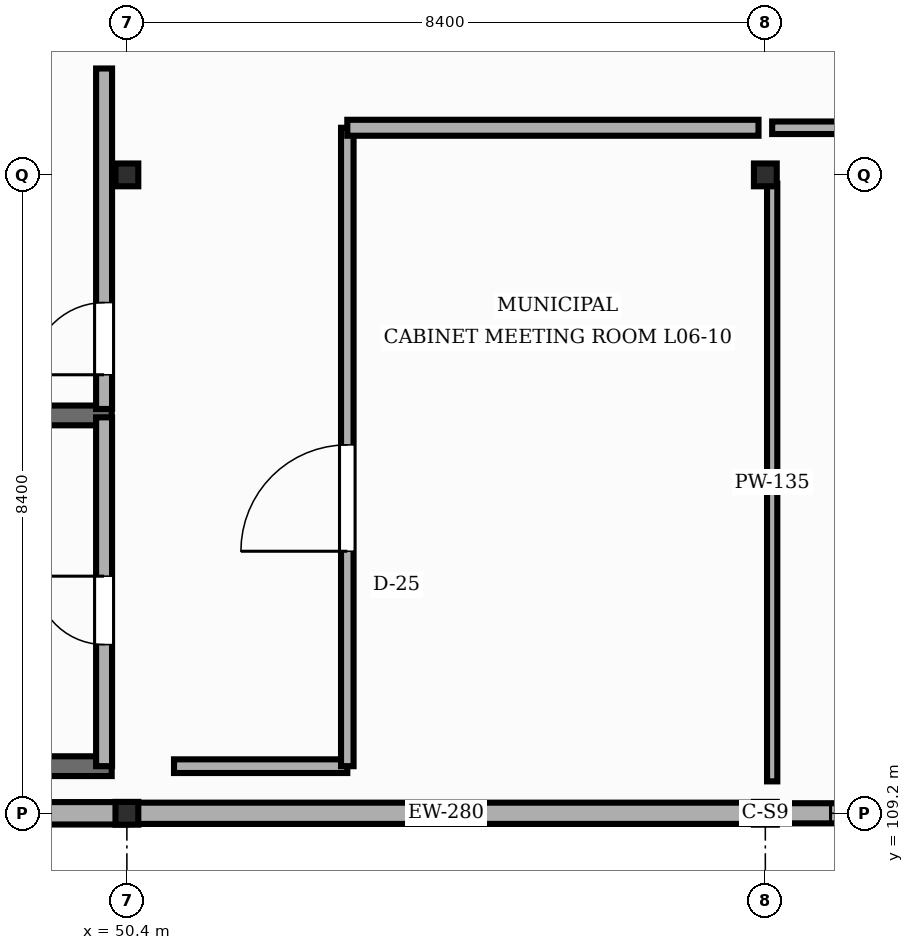
"""IFC4 building model, lengths in metres.
Left out: names, types, materials, properties, quantities, classifications, styles, units other than length and angle.
Written with IfcOpenShell. Run it as: python <this file> out.ifc"""

import sys

from ifc_helpers import new_model, si_unit, direction, frame, frame_2d, origin, origin_2d, place, context, subcontext, project, spatial, rectangle, i_section, extrude, element, fill, save


model = new_model("IFC4")
c1 = context("Model", 3, precision=1e-05, world=origin(), true_north=direction((0.0, 1.0)))
c2 = subcontext(c1, "Body", "Model", "MODEL_VIEW")
j1 = project(units=[si_unit("LENGTHUNIT", "METRE"), si_unit("PLANEANGLEUNIT", "RADIAN")], contexts=[c1])
p1 = place(None, origin())
s1 = spatial("IfcSite", under=j1, at=p1, CompositionType="ELEMENT")
p2 = place(p1, origin())
s2 = spatial("IfcBuilding", under=s1, at=p2, CompositionType="ELEMENT")
p3 = place(p2, frame((0.0, 0.0, 26.1)))
s3 = spatial("IfcBuildingStorey", under=s2, at=p3, CompositionType="ELEMENT", Elevation=26.1)
for number, where, z_axis, x_axis in (
    (1, (50.4, 109.2, 0.0), (0.0, 0.0, 1.0), (1.0, 0.0, 0.0)),
    (2, (50.4, 117.6, 0.0), (0.0, 0.0, 1.0), (1.0, 0.0, 0.0)),
    (3, (58.8, 109.2, 0.0), (0.0, 0.0, 1.0), (1.0, 0.0, 0.0)),
    (4, (58.8, 117.6, 0.0), (0.0, 0.0, 1.0), (1.0, 0.0, 0.0)),
):
    element("IfcColumn", number, at=place(p3, frame(where, z_axis=z_axis, x_axis=x_axis)), inside=s3, PredefinedType="COLUMN", context=c2, shape_type="SweptSolid", body=[
        extrude(i_section(OverallWidth=0.3, OverallDepth=0.3, WebThickness=0.011, FlangeThickness=0.019, FilletRadius=0.027, at=origin_2d()), origin(), (0.0, 0.0, 1.0), 4.05),
    ])
p4 = place(p3, frame((42.008, 109.2, 0.0), z_axis=(0.0, 0.0, 1.0), x_axis=(1.0, 0.0, 0.0)))
e5 = element("IfcWall", 5, at=p4, inside=s3, PredefinedType="STANDARD", context=c2, shape_type="SweptSolid", body=[
    extrude(rectangle(XDim=8.384, YDim=0.295, at=frame_2d((4.192, 0.0))), origin(), (0.0, 0.0, 1.0), 3.497),
])
p5 = place(p3, frame((50.408, 109.2, 0.0), z_axis=(0.0, 0.0, 1.0), x_axis=(1.0, 0.0, 0.0)))
e6 = element("IfcWall", 6, at=p5, inside=s3, PredefinedType="STANDARD", context=c2, shape_type="SweptSolid", body=[
    extrude(rectangle(XDim=8.384, YDim=0.28, at=frame_2d((4.192, 0.0))), origin(), (0.0, 0.0, 1.0), 3.527),
])
p6 = place(p3, frame((58.808, 109.2, 0.0), z_axis=(0.0, 0.0, 1.0), x_axis=(1.0, 0.0, 0.0)))
e7 = element("IfcWall", 7, at=p6, inside=s3, PredefinedType="STANDARD", context=c2, shape_type="SweptSolid", body=[
    extrude(rectangle(XDim=8.384, YDim=0.265, at=frame_2d((4.192, 0.0))), origin(), (0.0, 0.0, 1.0), 3.497),
])
p7 = place(p6, frame((0.85, 0.0, 0.9)))
e8 = element("IfcOpeningElement", 8, at=p7, cuts=e7, PredefinedType="OPENING", context=c2, shape_type="SweptSolid", body=[
    extrude(rectangle(XDim=1.52, YDim=1.65, at=frame_2d((0.76, 0.825))), frame((0.0, 0.142, 0.0), z_axis=(0.0, -1.0, 0.0), x_axis=(1.0, 0.0, 0.0)), (0.0, 0.0, 1.0), 0.285),
])
p8 = place(p6, frame((5.914, 0.0, 0.9)))
e9 = element("IfcOpeningElement", 9, at=p8, cuts=e7, PredefinedType="OPENING", context=c2, shape_type="SweptSolid", body=[
    extrude(rectangle(XDim=1.62, YDim=1.65, at=frame_2d((0.81, 0.825))), frame((0.0, 0.142, 0.0), z_axis=(0.0, -1.0, 0.0), x_axis=(1.0, 0.0, 0.0)), (0.0, 0.0, 1.0), 0.285),
])
for number, where, z_axis, x_axis in (
    (10, (47.165, 109.82, 0.0), (0.0, 0.0, 1.0), (1.0, 0.0, 0.0)),
    (11, (47.165, 114.435, 0.0), (0.0, 0.0, 1.0), (1.0, 0.0, 0.0)),
):
    element("IfcWall", number, at=place(p3, frame(where, z_axis=z_axis, x_axis=x_axis)), inside=s3, PredefinedType="SHEAR", context=c2, shape_type="SweptSolid", body=[
        extrude(rectangle(XDim=3.035, YDim=0.26, at=frame_2d((1.518, 0.0))), origin(), (0.0, 0.0, 1.0), 3.85),
    ])
p9 = place(p3, frame((50.1, 109.82, 0.0), z_axis=(0.0, 0.0, 1.0), x_axis=(0.0, 1.0, 0.0)))
e12 = element("IfcWall", 12, at=p9, inside=s3, PredefinedType="STANDARD", context=c2, shape_type="SweptSolid", body=[
    extrude(rectangle(XDim=4.59, YDim=0.21, at=frame_2d((2.295, 0.0))), origin(), (0.0, 0.0, 1.0), 3.587),
])
p10 = place(p9, frame((1.6, 0.0, 0.0)))
e13 = element("IfcOpeningElement", 13, at=p10, cuts=e12, PredefinedType="OPENING", context=c2, shape_type="SweptSolid", body=[
    extrude(rectangle(XDim=0.9, YDim=2.1, at=frame_2d((0.45, 1.05))), frame((0.0, 0.115, 0.0), z_axis=(0.0, -1.0, 0.0), x_axis=(1.0, 0.0, 0.0)), (0.0, 0.0, 1.0), 0.23),
])
p11 = place(p3, frame((50.1, 114.52, 0.0), z_axis=(0.0, 0.0, 1.0), x_axis=(0.0, 1.0, 0.0)))
e14 = element("IfcWall", 14, at=p11, inside=s3, PredefinedType="STANDARD", context=c2, shape_type="SweptSolid", body=[
    extrude(rectangle(XDim=4.48, YDim=0.21, at=frame_2d((2.24, 0.0))), origin(), (0.0, 0.0, 1.0), 3.497),
])
p12 = place(p11, frame((0.45, 0.0, 0.0)))
e15 = element("IfcOpeningElement", 15, at=p12, cuts=e14, PredefinedType="OPENING", context=c2, shape_type="SweptSolid", body=[
    extrude(rectangle(XDim=0.95, YDim=2.15, at=frame_2d((0.475, 1.075))), frame((0.0, 0.115, 0.0), z_axis=(0.0, -1.0, 0.0), x_axis=(1.0, 0.0, 0.0)), (0.0, 0.0, 1.0), 0.23),
])
p13 = place(p3, frame((58.89, 109.62, -0.004), z_axis=(0.0, 0.0, 1.0), x_axis=(0.0, 1.0, 0.0)))
e16 = element("IfcWall", 16, at=p13, inside=s3, PredefinedType="STANDARD", context=c2, shape_type="SweptSolid", body=[
    extrude(rectangle(XDim=7.865, YDim=0.135, at=frame_2d((3.933, 0.0))), origin(), (0.0, 0.0, 1.0), 3.501),
])
p14 = place(p3, frame((58.89, 118.22, -0.004), z_axis=(0.0, 0.0, 1.0), x_axis=(1.0, 0.0, 0.0)))
e17 = element("IfcWall", 17, at=p14, inside=s3, PredefinedType="STANDARD", context=c2, shape_type="SweptSolid", body=[
    extrude(rectangle(XDim=11.02, YDim=0.165, at=frame_2d((5.51, 0.0))), origin(), (0.0, 0.0, 1.0), 3.854),
])
p15 = place(p14, frame((3.157, 0.0, 0.0)))
e18 = element("IfcOpeningElement", 18, at=p15, cuts=e17, PredefinedType="OPENING", context=c2, shape_type="SweptSolid", body=[
    extrude(rectangle(XDim=1.4, YDim=2.14, at=frame_2d((0.7, 1.07))), frame((0.0, 0.093, 0.0), z_axis=(0.0, -1.0, 0.0), x_axis=(1.0, 0.0, 0.0)), (0.0, 0.0, 1.0), 0.185),
])
p16 = place(p3, frame((51.02, 109.82, -0.004), z_axis=(0.0, 0.0, 1.0), x_axis=(1.0, 0.0, 0.0)))
e19 = element("IfcWall", 19, at=p16, inside=s3, PredefinedType="STANDARD", context=c2, shape_type="SweptSolid", body=[
    extrude(rectangle(XDim=2.28, YDim=0.18, at=frame_2d((1.14, 0.0))), origin(), (0.0, 0.0, 1.0), 3.854),
])
p17 = place(p3, frame((53.3, 109.82, -0.004), z_axis=(0.0, 0.0, 1.0), x_axis=(0.0, 1.0, 0.0)))
e20 = element("IfcWall", 20, at=p17, inside=s3, PredefinedType="STANDARD", context=c2, shape_type="SweptSolid", body=[
    extrude(rectangle(XDim=8.4, YDim=0.165, at=frame_2d((4.2, 0.0))), origin(), (0.0, 0.0, 1.0), 3.854),
])
p18 = place(p17, frame((2.828, 0.0, 0.0)))
e21 = element("IfcOpeningElement", 21, at=p18, cuts=e20, PredefinedType="OPENING", context=c2, shape_type="SweptSolid", body=[
    extrude(rectangle(XDim=1.4, YDim=2.22, at=frame_2d((0.7, 1.11))), frame((0.0, 0.093, 0.0), z_axis=(0.0, -1.0, 0.0), x_axis=(1.0, 0.0, 0.0)), (0.0, 0.0, 1.0), 0.185),
])
p19 = place(p3, frame((53.3, 118.22, -0.004), z_axis=(0.0, 0.0, 1.0), x_axis=(1.0, 0.0, 0.0)))
e22 = element("IfcWall", 22, at=p19, inside=s3, PredefinedType="STANDARD", context=c2, shape_type="SweptSolid", body=[
    extrude(rectangle(XDim=5.41, YDim=0.21, at=frame_2d((2.705, 0.0))), origin(), (0.0, 0.0, 1.0), 3.854),
])
p20 = place(p7, origin())
e23 = element("IfcWindow", 23, at=p20, inside=s3, PartitioningType="SINGLE_PANEL", PredefinedType="WINDOW", context=c2, shape_type="SweptSolid", body=[
    extrude(rectangle(XDim=1.52, YDim=1.65, at=frame_2d((0.76, 0.825))), frame((0.0, 0.03, 0.0), z_axis=(0.0, -1.0, 0.0), x_axis=(1.0, 0.0, 0.0)), (0.0, 0.0, 1.0), 0.06),
])
fill(e8, e23)
p21 = place(p10, origin())
e24 = element("IfcDoor", 24, at=p21, inside=s3, OperationType="SINGLE_SWING_RIGHT", PredefinedType="DOOR", context=c2, shape_type="SweptSolid", body=[
    extrude(rectangle(XDim=0.9, YDim=2.1, at=frame_2d((0.45, 1.05))), frame((0.0, 0.025, 0.0), z_axis=(0.0, -1.0, 0.0), x_axis=(1.0, 0.0, 0.0)), (0.0, 0.0, 1.0), 0.05),
])
fill(e13, e24)
p22 = place(p12, origin())
e25 = element("IfcDoor", 25, at=p22, inside=s3, OperationType="SINGLE_SWING_LEFT", PredefinedType="DOOR", context=c2, shape_type="SweptSolid", body=[
    extrude(rectangle(XDim=0.95, YDim=2.15, at=frame_2d((0.475, 1.075))), frame((0.0, 0.025, 0.0), z_axis=(0.0, -1.0, 0.0), x_axis=(1.0, 0.0, 0.0)), (0.0, 0.0, 1.0), 0.05),
])
fill(e15, e25)
p23 = place(p18, origin())
e26 = element("IfcDoor", 26, at=p23, inside=s3, OperationType="SINGLE_SWING_LEFT", PredefinedType="DOOR", context=c2, shape_type="SweptSolid", body=[
    extrude(rectangle(XDim=1.4, YDim=2.22, at=frame_2d((0.7, 1.11))), frame((0.0, 0.025, 0.0), z_axis=(0.0, -1.0, 0.0), x_axis=(1.0, 0.0, 0.0)), (0.0, 0.0, 1.0), 0.05),
])
fill(e21, e26)
save(model, sys.argv[1])
